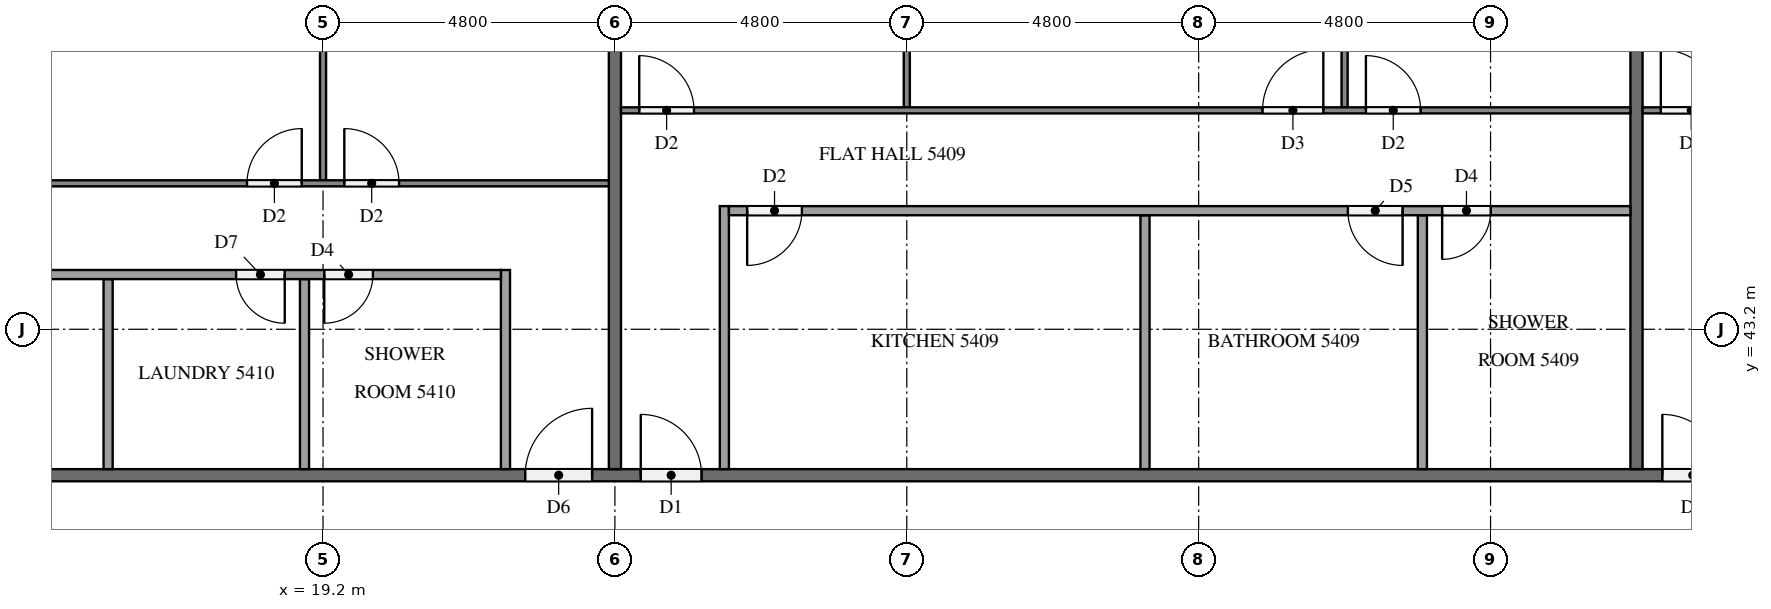
"""IFC4 building model, lengths in metres.
Left out: names, types, materials, properties, quantities, classifications, styles, units other than length and angle.
Written with IfcOpenShell. Run it as: python <this file> out.ifc"""

import sys

from ifc_helpers import new_model, si_unit, direction, frame, frame_2d, origin, place, context, subcontext, project, spatial, rectangle, extrude, element, fill, save


model = new_model("IFC4")
c1 = context("Model", 3, precision=1e-05, world=origin(), true_north=direction((0.0, 1.0)))
c2 = subcontext(c1, "Body", "Model", "MODEL_VIEW")
j1 = project(units=[si_unit("LENGTHUNIT", "METRE"), si_unit("PLANEANGLEUNIT", "RADIAN")], contexts=[c1])
p1 = place(None, origin())
s1 = spatial("IfcSite", under=j1, at=p1, CompositionType="ELEMENT")
p2 = place(p1, origin())
s2 = spatial("IfcBuilding", under=s1, at=p2, CompositionType="ELEMENT")
p3 = place(p2, frame((0.0, 0.0, 208.8)))
s3 = spatial("IfcBuildingStorey", under=s2, at=p3, CompositionType="ELEMENT", Elevation=208.8)
p4 = place(p3, frame((11.9, 40.8, 0.0), z_axis=(0.0, 0.0, 1.0), x_axis=(1.0, 0.0, 0.0)))
e1 = element("IfcWall", 1, at=p4, inside=s3, PredefinedType="PARTITIONING", context=c2, shape_type="SweptSolid", body=[
    extrude(rectangle(XDim=38.6, YDim=0.2, at=frame_2d((19.3, 0.0))), origin(), (0.0, 0.0, 1.0), 3.2),
])
p5 = place(p4, frame((36.525, 0.0, 0.0)))
e2 = element("IfcOpeningElement", 2, at=p5, cuts=e1, PredefinedType="OPENING", context=c2, shape_type="SweptSolid", body=[
    extrude(rectangle(XDim=1.0, YDim=2.1, at=frame_2d((0.5, 1.05))), frame((0.0, 0.11, 0.0), z_axis=(0.0, -1.0, 0.0), x_axis=(1.0, 0.0, 0.0)), (0.0, 0.0, 1.0), 0.22),
])
p6 = place(p4, frame((29.325, 0.0, 0.0)))
e3 = element("IfcOpeningElement", 3, at=p6, cuts=e1, PredefinedType="OPENING", context=c2, shape_type="SweptSolid", body=[
    extrude(rectangle(XDim=1.0, YDim=2.1, at=frame_2d((0.5, 1.05))), frame((0.0, 0.11, 0.0), z_axis=(0.0, -1.0, 0.0), x_axis=(1.0, 0.0, 0.0)), (0.0, 0.0, 1.0), 0.22),
])
p7 = place(p4, frame((12.525, 0.0, 0.0)))
e4 = element("IfcOpeningElement", 4, at=p7, cuts=e1, PredefinedType="OPENING", context=c2, shape_type="SweptSolid", body=[
    extrude(rectangle(XDim=1.0, YDim=2.1, at=frame_2d((0.5, 1.05))), frame((0.0, 0.11, 0.0), z_axis=(0.0, -1.0, 0.0), x_axis=(1.0, 0.0, 0.0)), (0.0, 0.0, 1.0), 0.22),
])
p8 = place(p4, frame((10.625, 0.0, 0.0)))
e5 = element("IfcOpeningElement", 5, at=p8, cuts=e1, PredefinedType="OPENING", context=c2, shape_type="SweptSolid", body=[
    extrude(rectangle(XDim=1.1, YDim=2.1, at=frame_2d((0.55, 1.05))), frame((0.0, 0.11, 0.0), z_axis=(0.0, -1.0, 0.0), x_axis=(1.0, 0.0, 0.0)), (0.0, 0.0, 1.0), 0.22),
])
for number, where, z_axis, x_axis in (
    (6, (40.8, 52.7, 0.0), (0.0, 0.0, 1.0), (0.0, -1.0, 0.0)),
    (7, (24.0, 52.7, 0.0), (0.0, 0.0, 1.0), (0.0, -1.0, 0.0)),
):
    element("IfcWall", number, at=place(p3, frame(where, z_axis=z_axis, x_axis=x_axis)), inside=s3, PredefinedType="PARTITIONING", context=c2, shape_type="SweptSolid", body=[
        extrude(rectangle(XDim=11.8, YDim=0.2, at=frame_2d((5.9, 0.0))), origin(), (0.0, 0.0, 1.0), 3.2),
    ])
p9 = place(p3, frame((40.9, 46.8, 0.0), z_axis=(0.0, 0.0, 1.0), x_axis=(1.0, 0.0, 0.0)))
e8 = element("IfcWall", 8, at=p9, inside=s3, PredefinedType="PARTITIONING", context=c2, shape_type="SweptSolid", body=[
    extrude(rectangle(XDim=7.0, YDim=0.1, at=frame_2d((3.5, 0.0))), origin(), (0.0, 0.0, 1.0), 3.2),
])
p10 = place(p9, frame((0.3, 0.0, 0.0)))
e9 = element("IfcOpeningElement", 9, at=p10, cuts=e8, PredefinedType="OPENING", context=c2, shape_type="SweptSolid", body=[
    extrude(rectangle(XDim=1.0, YDim=2.1, at=frame_2d((0.5, 1.05))), frame((0.0, 0.06, 0.0), z_axis=(0.0, -1.0, 0.0), x_axis=(1.0, 0.0, 0.0)), (0.0, 0.0, 1.0), 0.12),
])
p11 = place(p3, frame((28.8, 46.85, 0.0), z_axis=(0.0, 0.0, 1.0), x_axis=(0.0, 1.0, 0.0)))
e10 = element("IfcWall", 10, at=p11, inside=s3, PredefinedType="PARTITIONING", context=c2, shape_type="SweptSolid", body=[
    extrude(rectangle(XDim=5.625, YDim=0.1, at=frame_2d((2.812, 0.0))), origin(), (0.0, 0.0, 1.0), 3.2),
])
p12 = place(p3, frame((36.0, 46.85, 0.0), z_axis=(0.0, 0.0, 1.0), x_axis=(0.0, 1.0, 0.0)))
e11 = element("IfcWall", 11, at=p12, inside=s3, PredefinedType="PARTITIONING", context=c2, shape_type="SweptSolid", body=[
    extrude(rectangle(XDim=5.85, YDim=0.1, at=frame_2d((2.925, 0.0))), origin(), (0.0, 0.0, 1.0), 3.2),
])
p13 = place(p3, frame((24.1, 46.8, 0.0), z_axis=(0.0, 0.0, 1.0), x_axis=(1.0, 0.0, 0.0)))
e12 = element("IfcWall", 12, at=p13, inside=s3, PredefinedType="PARTITIONING", context=c2, shape_type="SweptSolid", body=[
    extrude(rectangle(XDim=16.6, YDim=0.1, at=frame_2d((8.3, 0.0))), origin(), (0.0, 0.0, 1.0), 3.2),
])
p14 = place(p13, frame((0.3, 0.0, 0.0)))
e13 = element("IfcOpeningElement", 13, at=p14, cuts=e12, PredefinedType="OPENING", context=c2, shape_type="SweptSolid", body=[
    extrude(rectangle(XDim=0.9, YDim=2.1, at=frame_2d((0.45, 1.05))), frame((0.0, 0.06, 0.0), z_axis=(0.0, -1.0, 0.0), x_axis=(1.0, 0.0, 0.0)), (0.0, 0.0, 1.0), 0.12),
])
p15 = place(p13, frame((10.55, 0.0, 0.0)))
e14 = element("IfcOpeningElement", 14, at=p15, cuts=e12, PredefinedType="OPENING", context=c2, shape_type="SweptSolid", body=[
    extrude(rectangle(XDim=1.0, YDim=2.1, at=frame_2d((0.5, 1.05))), frame((0.0, 0.06, 0.0), z_axis=(0.0, -1.0, 0.0), x_axis=(1.0, 0.0, 0.0)), (0.0, 0.0, 1.0), 0.12),
])
p16 = place(p13, frame((12.25, 0.0, 0.0)))
e15 = element("IfcOpeningElement", 15, at=p16, cuts=e12, PredefinedType="OPENING", context=c2, shape_type="SweptSolid", body=[
    extrude(rectangle(XDim=0.9, YDim=2.1, at=frame_2d((0.45, 1.05))), frame((0.0, 0.06, 0.0), z_axis=(0.0, -1.0, 0.0), x_axis=(1.0, 0.0, 0.0)), (0.0, 0.0, 1.0), 0.12),
])
for number, where, z_axis, x_axis in (
    (16, (32.717, 40.9, 0.0), (0.0, 0.0, 1.0), (0.0, 1.0, 0.0)),
    (17, (37.279, 40.9, 0.0), (0.0, 0.0, 1.0), (0.0, 1.0, 0.0)),
):
    element("IfcWall", number, at=place(p3, frame(where, z_axis=z_axis, x_axis=x_axis)), inside=s3, PredefinedType="PARTITIONING", context=c2, shape_type="SweptSolid", body=[
        extrude(rectangle(XDim=4.175, YDim=0.15, at=frame_2d((2.087, 0.0))), origin(), (0.0, 0.0, 1.0), 3.2),
    ])
p17 = place(p3, frame((25.8, 40.9, 0.0), z_axis=(0.0, 0.0, 1.0), x_axis=(0.0, 1.0, 0.0)))
e18 = element("IfcWall", 18, at=p17, inside=s3, PredefinedType="PARTITIONING", context=c2, shape_type="SweptSolid", body=[
    extrude(rectangle(XDim=4.325, YDim=0.15, at=frame_2d((2.163, 0.0))), origin(), (0.0, 0.0, 1.0), 3.2),
])
p18 = place(p3, frame((40.7, 45.15, 0.0), z_axis=(0.0, 0.0, 1.0), x_axis=(-1.0, 0.0, 0.0)))
e19 = element("IfcWall", 19, at=p18, inside=s3, PredefinedType="PARTITIONING", context=c2, shape_type="SweptSolid", body=[
    extrude(rectangle(XDim=14.825, YDim=0.15, at=frame_2d((7.413, 0.0))), origin(), (0.0, 0.0, 1.0), 3.2),
])
p19 = place(p18, frame((13.625, 0.0, 0.0)))
e20 = element("IfcOpeningElement", 20, at=p19, cuts=e19, PredefinedType="OPENING", context=c2, shape_type="SweptSolid", body=[
    extrude(rectangle(XDim=0.9, YDim=2.1, at=frame_2d((0.45, 1.05))), frame((0.0, 0.085, 0.0), z_axis=(0.0, -1.0, 0.0), x_axis=(1.0, 0.0, 0.0)), (0.0, 0.0, 1.0), 0.17),
])
p20 = place(p18, frame((3.746, 0.0, 0.0)))
e21 = element("IfcOpeningElement", 21, at=p20, cuts=e19, PredefinedType="OPENING", context=c2, shape_type="SweptSolid", body=[
    extrude(rectangle(XDim=0.9, YDim=2.1, at=frame_2d((0.45, 1.05))), frame((0.0, 0.085, 0.0), z_axis=(0.0, -1.0, 0.0), x_axis=(1.0, 0.0, 0.0)), (0.0, 0.0, 1.0), 0.17),
])
p21 = place(p18, frame((2.296, 0.0, 0.0)))
e22 = element("IfcOpeningElement", 22, at=p21, cuts=e19, PredefinedType="OPENING", context=c2, shape_type="SweptSolid", body=[
    extrude(rectangle(XDim=0.8, YDim=2.1, at=frame_2d((0.4, 1.05))), frame((0.0, 0.085, 0.0), z_axis=(0.0, -1.0, 0.0), x_axis=(1.0, 0.0, 0.0)), (0.0, 0.0, 1.0), 0.17),
])
p22 = place(p3, frame((19.2, 45.65, 0.0), z_axis=(0.0, 0.0, 1.0), x_axis=(0.0, 1.0, 0.0)))
e23 = element("IfcWall", 23, at=p22, inside=s3, PredefinedType="PARTITIONING", context=c2, shape_type="SweptSolid", body=[
    extrude(rectangle(XDim=6.825, YDim=0.1, at=frame_2d((3.413, 0.0))), origin(), (0.0, 0.0, 1.0), 3.2),
])
p23 = place(p3, frame((4.9, 45.6, 0.0), z_axis=(0.0, 0.0, 1.0), x_axis=(1.0, 0.0, 0.0)))
e24 = element("IfcWall", 24, at=p23, inside=s3, PredefinedType="PARTITIONING", context=c2, shape_type="SweptSolid", body=[
    extrude(rectangle(XDim=19.0, YDim=0.1, at=frame_2d((9.5, 0.0))), origin(), (0.0, 0.0, 1.0), 3.2),
])
p24 = place(p23, frame((14.65, 0.0, 0.0)))
e25 = element("IfcOpeningElement", 25, at=p24, cuts=e24, PredefinedType="OPENING", context=c2, shape_type="SweptSolid", body=[
    extrude(rectangle(XDim=0.9, YDim=2.1, at=frame_2d((0.45, 1.05))), frame((0.0, 0.06, 0.0), z_axis=(0.0, -1.0, 0.0), x_axis=(1.0, 0.0, 0.0)), (0.0, 0.0, 1.0), 0.12),
])
p25 = place(p23, frame((13.05, 0.0, 0.0)))
e26 = element("IfcOpeningElement", 26, at=p25, cuts=e24, PredefinedType="OPENING", context=c2, shape_type="SweptSolid", body=[
    extrude(rectangle(XDim=0.9, YDim=2.1, at=frame_2d((0.45, 1.05))), frame((0.0, 0.06, 0.0), z_axis=(0.0, -1.0, 0.0), x_axis=(1.0, 0.0, 0.0)), (0.0, 0.0, 1.0), 0.12),
])
p26 = place(p23, frame((5.05, 0.0, 0.0)))
e27 = element("IfcOpeningElement", 27, at=p26, cuts=e24, PredefinedType="OPENING", context=c2, shape_type="SweptSolid", body=[
    extrude(rectangle(XDim=0.9, YDim=2.1, at=frame_2d((0.45, 1.05))), frame((0.0, 0.06, 0.0), z_axis=(0.0, -1.0, 0.0), x_axis=(1.0, 0.0, 0.0)), (0.0, 0.0, 1.0), 0.12),
])
p27 = place(p23, frame((3.35, 0.0, 0.0)))
e28 = element("IfcOpeningElement", 28, at=p27, cuts=e24, PredefinedType="OPENING", context=c2, shape_type="SweptSolid", body=[
    extrude(rectangle(XDim=1.0, YDim=2.1, at=frame_2d((0.5, 1.05))), frame((0.0, 0.06, 0.0), z_axis=(0.0, -1.0, 0.0), x_axis=(1.0, 0.0, 0.0)), (0.0, 0.0, 1.0), 0.12),
])
for number, where, z_axis, x_axis in (
    (29, (18.895, 40.9, 0.0), (0.0, 0.0, 1.0), (0.0, 1.0, 0.0)),
    (30, (15.666, 40.9, 0.0), (0.0, 0.0, 1.0), (0.0, 1.0, 0.0)),
):
    element("IfcWall", number, at=place(p3, frame(where, z_axis=z_axis, x_axis=x_axis)), inside=s3, PredefinedType="PARTITIONING", context=c2, shape_type="SweptSolid", body=[
        extrude(rectangle(XDim=3.125, YDim=0.15, at=frame_2d((1.562, 0.0))), origin(), (0.0, 0.0, 1.0), 3.2),
    ])
p28 = place(p3, frame((22.2, 40.9, 0.0), z_axis=(0.0, 0.0, 1.0), x_axis=(0.0, 1.0, 0.0)))
e31 = element("IfcWall", 31, at=p28, inside=s3, PredefinedType="PARTITIONING", context=c2, shape_type="SweptSolid", body=[
    extrude(rectangle(XDim=3.275, YDim=0.15, at=frame_2d((1.638, 0.0))), origin(), (0.0, 0.0, 1.0), 3.2),
])
p29 = place(p3, frame((22.125, 44.1, 0.0), z_axis=(0.0, 0.0, 1.0), x_axis=(-1.0, 0.0, 0.0)))
e32 = element("IfcWall", 32, at=p29, inside=s3, PredefinedType="PARTITIONING", context=c2, shape_type="SweptSolid", body=[
    extrude(rectangle(XDim=17.225, YDim=0.15, at=frame_2d((8.613, 0.0))), origin(), (0.0, 0.0, 1.0), 3.2),
])
p30 = place(p29, frame((2.105, 0.0, 0.0)))
e33 = element("IfcOpeningElement", 33, at=p30, cuts=e32, PredefinedType="OPENING", context=c2, shape_type="SweptSolid", body=[
    extrude(rectangle(XDim=0.8, YDim=2.1, at=frame_2d((0.4, 1.05))), frame((0.0, 0.085, 0.0), z_axis=(0.0, -1.0, 0.0), x_axis=(1.0, 0.0, 0.0)), (0.0, 0.0, 1.0), 0.17),
])
p31 = place(p29, frame((3.555, 0.0, 0.0)))
e34 = element("IfcOpeningElement", 34, at=p31, cuts=e32, PredefinedType="OPENING", context=c2, shape_type="SweptSolid", body=[
    extrude(rectangle(XDim=0.8, YDim=2.1, at=frame_2d((0.4, 1.05))), frame((0.0, 0.085, 0.0), z_axis=(0.0, -1.0, 0.0), x_axis=(1.0, 0.0, 0.0)), (0.0, 0.0, 1.0), 0.17),
])
p32 = place(p29, frame((11.694, 0.0, 0.0)))
e35 = element("IfcOpeningElement", 35, at=p32, cuts=e32, PredefinedType="OPENING", context=c2, shape_type="SweptSolid", body=[
    extrude(rectangle(XDim=0.9, YDim=2.1, at=frame_2d((0.45, 1.05))), frame((0.0, 0.085, 0.0), z_axis=(0.0, -1.0, 0.0), x_axis=(1.0, 0.0, 0.0)), (0.0, 0.0, 1.0), 0.17),
])
p33 = place(p29, frame((13.244, 0.0, 0.0)))
e36 = element("IfcOpeningElement", 36, at=p33, cuts=e32, PredefinedType="OPENING", context=c2, shape_type="SweptSolid", body=[
    extrude(rectangle(XDim=0.9, YDim=2.1, at=frame_2d((0.45, 1.05))), frame((0.0, 0.085, 0.0), z_axis=(0.0, -1.0, 0.0), x_axis=(1.0, 0.0, 0.0)), (0.0, 0.0, 1.0), 0.17),
])
p34 = place(p6, origin())
e37 = element("IfcDoor", 37, at=p34, inside=s3, OperationType="SINGLE_SWING_LEFT", PredefinedType="DOOR", context=c2, shape_type="SweptSolid", body=[
    extrude(rectangle(XDim=1.0, YDim=2.1, at=frame_2d((0.5, 1.05))), frame((0.0, 0.025, 0.0), z_axis=(0.0, -1.0, 0.0), x_axis=(1.0, 0.0, 0.0)), (0.0, 0.0, 1.0), 0.05),
])
fill(e3, e37)
p35 = place(p7, origin())
e38 = element("IfcDoor", 38, at=p35, inside=s3, OperationType="SINGLE_SWING_LEFT", PredefinedType="DOOR", context=c2, shape_type="SweptSolid", body=[
    extrude(rectangle(XDim=1.0, YDim=2.1, at=frame_2d((0.5, 1.05))), frame((0.0, 0.025, 0.0), z_axis=(0.0, -1.0, 0.0), x_axis=(1.0, 0.0, 0.0)), (0.0, 0.0, 1.0), 0.05),
])
fill(e4, e38)
p36 = place(p8, origin())
e39 = element("IfcDoor", 39, at=p36, inside=s3, OperationType="SINGLE_SWING_RIGHT", PredefinedType="DOOR", context=c2, shape_type="SweptSolid", body=[
    extrude(rectangle(XDim=1.1, YDim=2.1, at=frame_2d((0.55, 1.05))), frame((0.0, 0.025, 0.0), z_axis=(0.0, -1.0, 0.0), x_axis=(1.0, 0.0, 0.0)), (0.0, 0.0, 1.0), 0.05),
])
fill(e5, e39)
p37 = place(p10, origin())
e40 = element("IfcDoor", 40, at=p37, inside=s3, OperationType="SINGLE_SWING_LEFT", PredefinedType="DOOR", context=c2, shape_type="SweptSolid", body=[
    extrude(rectangle(XDim=1.0, YDim=2.1, at=frame_2d((0.5, 1.05))), frame((0.0, 0.025, 0.0), z_axis=(0.0, -1.0, 0.0), x_axis=(1.0, 0.0, 0.0)), (0.0, 0.0, 1.0), 0.05),
])
fill(e9, e40)
p38 = place(p14, origin())
e41 = element("IfcDoor", 41, at=p38, inside=s3, OperationType="SINGLE_SWING_LEFT", PredefinedType="DOOR", context=c2, shape_type="SweptSolid", body=[
    extrude(rectangle(XDim=0.9, YDim=2.1, at=frame_2d((0.45, 1.05))), frame((0.0, 0.025, 0.0), z_axis=(0.0, -1.0, 0.0), x_axis=(1.0, 0.0, 0.0)), (0.0, 0.0, 1.0), 0.05),
])
fill(e13, e41)
p39 = place(p15, origin())
e42 = element("IfcDoor", 42, at=p39, inside=s3, OperationType="SINGLE_SWING_RIGHT", PredefinedType="DOOR", context=c2, shape_type="SweptSolid", body=[
    extrude(rectangle(XDim=1.0, YDim=2.1, at=frame_2d((0.5, 1.05))), frame((0.0, 0.025, 0.0), z_axis=(0.0, -1.0, 0.0), x_axis=(1.0, 0.0, 0.0)), (0.0, 0.0, 1.0), 0.05),
])
fill(e14, e42)
p40 = place(p16, origin())
e43 = element("IfcDoor", 43, at=p40, inside=s3, OperationType="SINGLE_SWING_LEFT", PredefinedType="DOOR", context=c2, shape_type="SweptSolid", body=[
    extrude(rectangle(XDim=0.9, YDim=2.1, at=frame_2d((0.45, 1.05))), frame((0.0, 0.025, 0.0), z_axis=(0.0, -1.0, 0.0), x_axis=(1.0, 0.0, 0.0)), (0.0, 0.0, 1.0), 0.05),
])
fill(e15, e43)
p41 = place(p19, origin())
e44 = element("IfcDoor", 44, at=p41, inside=s3, OperationType="SINGLE_SWING_RIGHT", PredefinedType="DOOR", context=c2, shape_type="SweptSolid", body=[
    extrude(rectangle(XDim=0.9, YDim=2.1, at=frame_2d((0.45, 1.05))), frame((0.0, 0.025, 0.0), z_axis=(0.0, -1.0, 0.0), x_axis=(1.0, 0.0, 0.0)), (0.0, 0.0, 1.0), 0.05),
])
fill(e20, e44)
p42 = place(p20, origin())
e45 = element("IfcDoor", 45, at=p42, inside=s3, OperationType="SINGLE_SWING_LEFT", PredefinedType="DOOR", context=c2, shape_type="SweptSolid", body=[
    extrude(rectangle(XDim=0.9, YDim=2.1, at=frame_2d((0.45, 1.05))), frame((0.0, 0.025, 0.0), z_axis=(0.0, -1.0, 0.0), x_axis=(1.0, 0.0, 0.0)), (0.0, 0.0, 1.0), 0.05),
])
fill(e21, e45)
p43 = place(p21, origin())
e46 = element("IfcDoor", 46, at=p43, inside=s3, OperationType="SINGLE_SWING_RIGHT", PredefinedType="DOOR", context=c2, shape_type="SweptSolid", body=[
    extrude(rectangle(XDim=0.8, YDim=2.1, at=frame_2d((0.4, 1.05))), frame((0.0, 0.025, 0.0), z_axis=(0.0, -1.0, 0.0), x_axis=(1.0, 0.0, 0.0)), (0.0, 0.0, 1.0), 0.05),
])
fill(e22, e46)
p44 = place(p24, origin())
e47 = element("IfcDoor", 47, at=p44, inside=s3, OperationType="SINGLE_SWING_LEFT", PredefinedType="DOOR", context=c2, shape_type="SweptSolid", body=[
    extrude(rectangle(XDim=0.9, YDim=2.1, at=frame_2d((0.45, 1.05))), frame((0.0, 0.025, 0.0), z_axis=(0.0, -1.0, 0.0), x_axis=(1.0, 0.0, 0.0)), (0.0, 0.0, 1.0), 0.05),
])
fill(e25, e47)
p45 = place(p25, origin())
e48 = element("IfcDoor", 48, at=p45, inside=s3, OperationType="SINGLE_SWING_RIGHT", PredefinedType="DOOR", context=c2, shape_type="SweptSolid", body=[
    extrude(rectangle(XDim=0.9, YDim=2.1, at=frame_2d((0.45, 1.05))), frame((0.0, 0.025, 0.0), z_axis=(0.0, -1.0, 0.0), x_axis=(1.0, 0.0, 0.0)), (0.0, 0.0, 1.0), 0.05),
])
fill(e26, e48)
p46 = place(p30, origin())
e49 = element("IfcDoor", 49, at=p46, inside=s3, OperationType="SINGLE_SWING_RIGHT", PredefinedType="DOOR", context=c2, shape_type="SweptSolid", body=[
    extrude(rectangle(XDim=0.8, YDim=2.1, at=frame_2d((0.4, 1.05))), frame((0.0, 0.025, 0.0), z_axis=(0.0, -1.0, 0.0), x_axis=(1.0, 0.0, 0.0)), (0.0, 0.0, 1.0), 0.05),
])
fill(e33, e49)
p47 = place(p31, origin())
e50 = element("IfcDoor", 50, at=p47, inside=s3, OperationType="SINGLE_SWING_LEFT", PredefinedType="DOOR", context=c2, shape_type="SweptSolid", body=[
    extrude(rectangle(XDim=0.8, YDim=2.1, at=frame_2d((0.4, 1.05))), frame((0.0, 0.025, 0.0), z_axis=(0.0, -1.0, 0.0), x_axis=(1.0, 0.0, 0.0)), (0.0, 0.0, 1.0), 0.05),
])
fill(e34, e50)
save(model, sys.argv[1])
